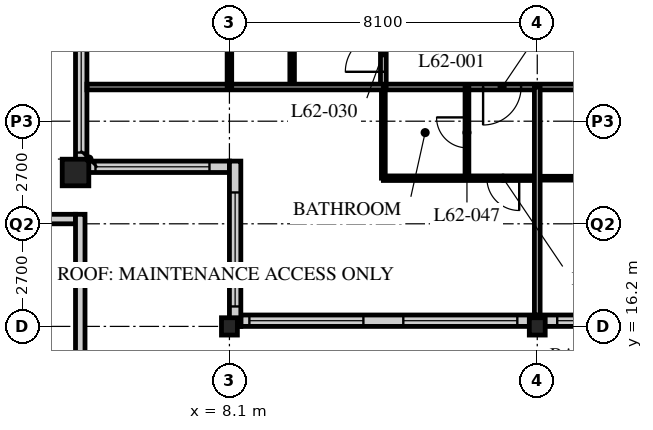
"""IFC4 building model, lengths in metres.
Left out: names, types, materials, properties, quantities, classifications, styles, units other than length and angle.
Written with IfcOpenShell. Run it as: python <this file> out.ifc"""

import sys

from ifc_helpers import new_model, si_unit, direction, frame, frame_2d, origin, origin_2d, place, context, subcontext, project, spatial, rectangle, hollow_rectangle, i_section, extrude, element, fill, save


model = new_model("IFC4")
c1 = context("Model", 3, precision=1e-05, world=origin(), true_north=direction((0.0, 1.0)))
c2 = subcontext(c1, "Body", "Model", "MODEL_VIEW")
j1 = project(units=[si_unit("LENGTHUNIT", "METRE"), si_unit("PLANEANGLEUNIT", "RADIAN")], contexts=[c1])
p1 = place(None, origin())
s1 = spatial("IfcSite", under=j1, at=p1, CompositionType="ELEMENT")
p2 = place(p1, origin())
s2 = spatial("IfcBuilding", under=s1, at=p2, CompositionType="ELEMENT")
p3 = place(p2, frame((0.0, 0.0, 242.4)))
s3 = spatial("IfcBuildingStorey", under=s2, at=p3, CompositionType="ELEMENT", Elevation=242.4)
p4 = place(p3, frame((4.05, 20.25, 0.0), z_axis=(0.0, 0.0, 1.0), x_axis=(1.0, 0.0, 0.0)))
e1 = element("IfcColumn", 1, at=p4, inside=s3, PredefinedType="COLUMN", context=c2, shape_type="SweptSolid", body=[
    extrude(hollow_rectangle(XDim=0.7, YDim=0.7, WallThickness=0.07, at=origin_2d()), origin(), (0.0, 0.0, 1.0), 3.9),
])
for number, where, z_axis, x_axis in (
    (2, (8.1, 16.2, 0.0), (0.0, 0.0, 1.0), (1.0, 0.0, 0.0)),
    (3, (16.2, 16.2, 0.0), (0.0, 0.0, 1.0), (1.0, 0.0, 0.0)),
):
    element("IfcColumn", number, at=place(p3, frame(where, z_axis=z_axis, x_axis=x_axis)), inside=s3, PredefinedType="COLUMN", context=c2, shape_type="SweptSolid", body=[
        extrude(i_section(OverallWidth=0.418, OverallDepth=0.456, WebThickness=0.042, FlangeThickness=0.067, FilletRadius=0.015, at=origin_2d()), origin(), (0.0, 0.0, 1.0), 3.9),
    ])
p5 = place(p3, frame((8.4, 16.35, 0.0), z_axis=(0.0, 0.0, 1.0), x_axis=(1.0, 0.0, 0.0)))
e4 = element("IfcWall", 4, at=p5, inside=s3, PredefinedType="SOLIDWALL", context=c2, shape_type="SweptSolid", body=[
    extrude(rectangle(XDim=40.2, YDim=0.3, at=frame_2d((20.1, 0.0))), origin(), (0.0, 0.0, 1.0), 3.69),
])
p6 = place(p5, frame((21.475, 0.0, 0.0)))
e5 = element("IfcOpeningElement", 5, at=p6, cuts=e4, PredefinedType="OPENING", context=c2, shape_type="SweptSolid", body=[
    extrude(rectangle(XDim=1.0, YDim=2.1, at=frame_2d((0.5, 1.05))), frame((0.0, 0.16, 0.0), z_axis=(0.0, -1.0, 0.0), x_axis=(1.0, 0.0, 0.0)), (0.0, 0.0, 1.0), 0.32),
])
p7 = place(p5, frame((0.225, 0.0, 0.6)))
e6 = element("IfcOpeningElement", 6, at=p7, cuts=e4, PredefinedType="OPENING", context=c2, shape_type="SweptSolid", body=[
    extrude(rectangle(XDim=3.0, YDim=2.3, at=frame_2d((1.5, 1.15))), frame((0.0, 0.16, 0.0), z_axis=(0.0, -1.0, 0.0), x_axis=(1.0, 0.0, 0.0)), (0.0, 0.0, 1.0), 0.32),
])
p8 = place(p5, frame((4.275, 0.0, 0.6)))
e7 = element("IfcOpeningElement", 7, at=p8, cuts=e4, PredefinedType="OPENING", context=c2, shape_type="SweptSolid", body=[
    extrude(rectangle(XDim=3.0, YDim=2.3, at=frame_2d((1.5, 1.15))), frame((0.0, 0.16, 0.0), z_axis=(0.0, -1.0, 0.0), x_axis=(1.0, 0.0, 0.0)), (0.0, 0.0, 1.0), 0.32),
])
p9 = place(p5, frame((8.325, 0.0, 0.6)))
e8 = element("IfcOpeningElement", 8, at=p9, cuts=e4, PredefinedType="OPENING", context=c2, shape_type="SweptSolid", body=[
    extrude(rectangle(XDim=3.0, YDim=2.3, at=frame_2d((1.5, 1.15))), frame((0.0, 0.16, 0.0), z_axis=(0.0, -1.0, 0.0), x_axis=(1.0, 0.0, 0.0)), (0.0, 0.0, 1.0), 0.32),
])
p10 = place(p5, frame((12.375, 0.0, 0.6)))
e9 = element("IfcOpeningElement", 9, at=p10, cuts=e4, PredefinedType="OPENING", context=c2, shape_type="SweptSolid", body=[
    extrude(rectangle(XDim=3.0, YDim=2.3, at=frame_2d((1.5, 1.15))), frame((0.0, 0.16, 0.0), z_axis=(0.0, -1.0, 0.0), x_axis=(1.0, 0.0, 0.0)), (0.0, 0.0, 1.0), 0.32),
])
p11 = place(p5, frame((16.425, 0.0, 0.6)))
e10 = element("IfcOpeningElement", 10, at=p11, cuts=e4, PredefinedType="OPENING", context=c2, shape_type="SweptSolid", body=[
    extrude(rectangle(XDim=3.0, YDim=2.3, at=frame_2d((1.5, 1.15))), frame((0.0, 0.16, 0.0), z_axis=(0.0, -1.0, 0.0), x_axis=(1.0, 0.0, 0.0)), (0.0, 0.0, 1.0), 0.32),
])
p12 = place(p5, frame((24.525, 0.0, 0.6)))
e11 = element("IfcOpeningElement", 11, at=p12, cuts=e4, PredefinedType="OPENING", context=c2, shape_type="SweptSolid", body=[
    extrude(rectangle(XDim=3.0, YDim=2.3, at=frame_2d((1.5, 1.15))), frame((0.0, 0.16, 0.0), z_axis=(0.0, -1.0, 0.0), x_axis=(1.0, 0.0, 0.0)), (0.0, 0.0, 1.0), 0.32),
])
p13 = place(p5, frame((28.575, 0.0, 0.6)))
e12 = element("IfcOpeningElement", 12, at=p13, cuts=e4, PredefinedType="OPENING", context=c2, shape_type="SweptSolid", body=[
    extrude(rectangle(XDim=3.0, YDim=2.3, at=frame_2d((1.5, 1.15))), frame((0.0, 0.16, 0.0), z_axis=(0.0, -1.0, 0.0), x_axis=(1.0, 0.0, 0.0)), (0.0, 0.0, 1.0), 0.32),
])
p14 = place(p5, frame((32.625, 0.0, 0.6)))
e13 = element("IfcOpeningElement", 13, at=p14, cuts=e4, PredefinedType="OPENING", context=c2, shape_type="SweptSolid", body=[
    extrude(rectangle(XDim=3.0, YDim=2.3, at=frame_2d((1.5, 1.15))), frame((0.0, 0.16, 0.0), z_axis=(0.0, -1.0, 0.0), x_axis=(1.0, 0.0, 0.0)), (0.0, 0.0, 1.0), 0.32),
])
p15 = place(p5, frame((36.675, 0.0, 0.6)))
e14 = element("IfcOpeningElement", 14, at=p15, cuts=e4, PredefinedType="OPENING", context=c2, shape_type="SweptSolid", body=[
    extrude(rectangle(XDim=3.0, YDim=2.3, at=frame_2d((1.5, 1.15))), frame((0.0, 0.16, 0.0), z_axis=(0.0, -1.0, 0.0), x_axis=(1.0, 0.0, 0.0)), (0.0, 0.0, 1.0), 0.32),
])
p16 = place(p3, frame((4.2, 24.6, 0.0), z_axis=(0.0, 0.0, 1.0), x_axis=(0.0, -1.0, 0.0)))
e15 = element("IfcWall", 15, at=p16, inside=s3, PredefinedType="SOLIDWALL", context=c2, shape_type="SweptSolid", body=[
    extrude(rectangle(XDim=4.35, YDim=0.3, at=frame_2d((2.175, 0.0))), origin(), (0.0, 0.0, 1.0), 3.69),
])
p17 = place(p16, frame((0.825, 0.0, 0.6)))
e16 = element("IfcOpeningElement", 16, at=p17, cuts=e15, PredefinedType="OPENING", context=c2, shape_type="SweptSolid", body=[
    extrude(rectangle(XDim=3.0, YDim=2.3, at=frame_2d((1.5, 1.15))), frame((0.0, 0.16, 0.0), z_axis=(0.0, -1.0, 0.0), x_axis=(1.0, 0.0, 0.0)), (0.0, 0.0, 1.0), 0.32),
])
p18 = place(p3, frame((4.35, 20.4, 0.0), z_axis=(0.0, 0.0, 1.0), x_axis=(1.0, 0.0, 0.0)))
e17 = element("IfcWall", 17, at=p18, inside=s3, PredefinedType="SOLIDWALL", context=c2, shape_type="SweptSolid", body=[
    extrude(rectangle(XDim=3.75, YDim=0.3, at=frame_2d((1.875, 0.0))), origin(), (0.0, 0.0, 1.0), 3.69),
])
p19 = place(p18, frame((0.225, 0.0, 0.6)))
e18 = element("IfcOpeningElement", 18, at=p19, cuts=e17, PredefinedType="OPENING", context=c2, shape_type="SweptSolid", body=[
    extrude(rectangle(XDim=3.0, YDim=2.3, at=frame_2d((1.5, 1.15))), frame((0.0, 0.16, 0.0), z_axis=(0.0, -1.0, 0.0), x_axis=(1.0, 0.0, 0.0)), (0.0, 0.0, 1.0), 0.32),
])
p20 = place(p3, frame((8.25, 20.55, 0.0), z_axis=(0.0, 0.0, 1.0), x_axis=(0.0, -1.0, 0.0)))
e19 = element("IfcWall", 19, at=p20, inside=s3, PredefinedType="SOLIDWALL", context=c2, shape_type="SweptSolid", body=[
    extrude(rectangle(XDim=4.35, YDim=0.3, at=frame_2d((2.175, 0.0))), origin(), (0.0, 0.0, 1.0), 3.69),
])
p21 = place(p20, frame((0.825, 0.0, 0.6)))
e20 = element("IfcOpeningElement", 20, at=p21, cuts=e19, PredefinedType="OPENING", context=c2, shape_type="SweptSolid", body=[
    extrude(rectangle(XDim=3.0, YDim=2.3, at=frame_2d((1.5, 1.15))), frame((0.0, 0.16, 0.0), z_axis=(0.0, -1.0, 0.0), x_axis=(1.0, 0.0, 0.0)), (0.0, 0.0, 1.0), 0.32),
])
p22 = place(p3, frame((0.25, 19.025, 0.0), z_axis=(0.0, 0.0, 1.0), x_axis=(1.0, 0.0, 0.0)))
e21 = element("IfcWall", 21, at=p22, inside=s3, PredefinedType="PARAPET", context=c2, shape_type="SweptSolid", body=[
    extrude(rectangle(XDim=3.8, YDim=0.25, at=frame_2d((1.9, 0.0))), origin(), (0.0, 0.0, 1.0), 1.38),
])
p23 = place(p3, frame((4.175, 19.15, 0.0), z_axis=(0.0, 0.0, 1.0), x_axis=(0.0, -1.0, 0.0)))
e22 = element("IfcWall", 22, at=p23, inside=s3, PredefinedType="PARAPET", context=c2, shape_type="SweptSolid", body=[
    extrude(rectangle(XDim=4.3, YDim=0.25, at=frame_2d((2.15, 0.0))), origin(), (0.0, 0.0, 1.0), 1.38),
])
p24 = place(p3, frame((12.15, 22.5, 0.0), z_axis=(0.0, 0.0, 1.0), x_axis=(1.0, 0.0, 0.0)))
e23 = element("IfcWall", 23, at=p24, inside=s3, PredefinedType="PARTITIONING", context=c2, shape_type="SweptSolid", body=[
    extrude(rectangle(XDim=32.4, YDim=0.15, at=frame_2d((16.2, 0.0))), origin(), (0.0, 0.0, 1.0), 3.69),
])
p25 = place(p24, frame((6.4, 0.0, 0.0)))
e24 = element("IfcOpeningElement", 24, at=p25, cuts=e23, PredefinedType="OPENING", context=c2, shape_type="SweptSolid", body=[
    extrude(rectangle(XDim=1.0, YDim=2.1, at=frame_2d((0.5, 1.05))), frame((0.0, 0.085, 0.0), z_axis=(0.0, -1.0, 0.0), x_axis=(1.0, 0.0, 0.0)), (0.0, 0.0, 1.0), 0.17),
])
p26 = place(p24, frame((10.45, 0.0, 0.0)))
e25 = element("IfcOpeningElement", 25, at=p26, cuts=e23, PredefinedType="OPENING", context=c2, shape_type="SweptSolid", body=[
    extrude(rectangle(XDim=1.0, YDim=2.1, at=frame_2d((0.5, 1.05))), frame((0.0, 0.085, 0.0), z_axis=(0.0, -1.0, 0.0), x_axis=(1.0, 0.0, 0.0)), (0.0, 0.0, 1.0), 0.17),
])
p27 = place(p24, frame((14.5, 0.0, 0.0)))
e26 = element("IfcOpeningElement", 26, at=p27, cuts=e23, PredefinedType="OPENING", context=c2, shape_type="SweptSolid", body=[
    extrude(rectangle(XDim=1.0, YDim=2.1, at=frame_2d((0.5, 1.05))), frame((0.0, 0.085, 0.0), z_axis=(0.0, -1.0, 0.0), x_axis=(1.0, 0.0, 0.0)), (0.0, 0.0, 1.0), 0.17),
])
p28 = place(p24, frame((17.725, 0.0, 0.0)))
e27 = element("IfcOpeningElement", 27, at=p28, cuts=e23, PredefinedType="OPENING", context=c2, shape_type="SweptSolid", body=[
    extrude(rectangle(XDim=1.0, YDim=2.1, at=frame_2d((0.5, 1.05))), frame((0.0, 0.085, 0.0), z_axis=(0.0, -1.0, 0.0), x_axis=(1.0, 0.0, 0.0)), (0.0, 0.0, 1.0), 0.17),
])
p29 = place(p24, frame((22.6, 0.0, 0.0)))
e28 = element("IfcOpeningElement", 28, at=p29, cuts=e23, PredefinedType="OPENING", context=c2, shape_type="SweptSolid", body=[
    extrude(rectangle(XDim=1.0, YDim=2.1, at=frame_2d((0.5, 1.05))), frame((0.0, 0.085, 0.0), z_axis=(0.0, -1.0, 0.0), x_axis=(1.0, 0.0, 0.0)), (0.0, 0.0, 1.0), 0.17),
])
p30 = place(p24, frame((26.65, 0.0, 0.0)))
e29 = element("IfcOpeningElement", 29, at=p30, cuts=e23, PredefinedType="OPENING", context=c2, shape_type="SweptSolid", body=[
    extrude(rectangle(XDim=1.0, YDim=2.1, at=frame_2d((0.5, 1.05))), frame((0.0, 0.085, 0.0), z_axis=(0.0, -1.0, 0.0), x_axis=(1.0, 0.0, 0.0)), (0.0, 0.0, 1.0), 0.17),
])
p31 = place(p24, frame((2.625, 0.0, 0.0)))
e30 = element("IfcOpeningElement", 30, at=p31, cuts=e23, PredefinedType="OPENING", context=c2, shape_type="SweptSolid", body=[
    extrude(rectangle(XDim=1.0, YDim=2.1, at=frame_2d((0.5, 1.05))), frame((0.0, 0.085, 0.0), z_axis=(0.0, -1.0, 0.0), x_axis=(1.0, 0.0, 0.0)), (0.0, 0.0, 1.0), 0.17),
])
p32 = place(p24, frame((28.775, 0.0, 0.0)))
e31 = element("IfcOpeningElement", 31, at=p32, cuts=e23, PredefinedType="OPENING", context=c2, shape_type="SweptSolid", body=[
    extrude(rectangle(XDim=1.0, YDim=2.1, at=frame_2d((0.5, 1.05))), frame((0.0, 0.085, 0.0), z_axis=(0.0, -1.0, 0.0), x_axis=(1.0, 0.0, 0.0)), (0.0, 0.0, 1.0), 0.17),
])
p33 = place(p3, frame((12.15, 22.5, 0.0), z_axis=(0.0, 0.0, 1.0), x_axis=(0.0, 1.0, 0.0)))
e32 = element("IfcWall", 32, at=p33, inside=s3, PredefinedType="PARTITIONING", context=c2, shape_type="SweptSolid", body=[
    extrude(rectangle(XDim=26.1, YDim=0.15, at=frame_2d((13.05, 0.0))), origin(), (0.0, 0.0, 1.0), 3.69),
])
p34 = place(p33, frame((0.4, 0.0, 0.0)))
e33 = element("IfcOpeningElement", 33, at=p34, cuts=e32, PredefinedType="OPENING", context=c2, shape_type="SweptSolid", body=[
    extrude(rectangle(XDim=1.0, YDim=2.1, at=frame_2d((0.5, 1.05))), frame((0.0, 0.085, 0.0), z_axis=(0.0, -1.0, 0.0), x_axis=(1.0, 0.0, 0.0)), (0.0, 0.0, 1.0), 0.17),
])
p35 = place(p33, frame((14.35, 0.0, 0.0)))
e34 = element("IfcOpeningElement", 34, at=p35, cuts=e32, PredefinedType="OPENING", context=c2, shape_type="SweptSolid", body=[
    extrude(rectangle(XDim=1.0, YDim=2.1, at=frame_2d((0.5, 1.05))), frame((0.0, 0.085, 0.0), z_axis=(0.0, -1.0, 0.0), x_axis=(1.0, 0.0, 0.0)), (0.0, 0.0, 1.0), 0.17),
])
p36 = place(p3, frame((16.2, 20.1, 0.0), z_axis=(0.0, 0.0, 1.0), x_axis=(1.0, 0.0, 0.0)))
e35 = element("IfcWall", 35, at=p36, inside=s3, PredefinedType="PARTITIONING", context=c2, shape_type="SweptSolid", body=[
    extrude(rectangle(XDim=2.2, YDim=0.1, at=frame_2d((1.1, 0.0))), origin(), (0.0, 0.0, 1.0), 3.69),
])
p37 = place(p3, frame((9.75, 22.5, 0.0), z_axis=(0.0, 0.0, 1.0), x_axis=(0.0, 1.0, 0.0)))
e36 = element("IfcWall", 36, at=p37, inside=s3, PredefinedType="PARTITIONING", context=c2, shape_type="SweptSolid", body=[
    extrude(rectangle(XDim=26.1, YDim=0.12, at=frame_2d((13.05, 0.0))), origin(), (0.0, 0.0, 1.0), 3.69),
])
p38 = place(p37, frame((0.975, 0.0, 0.0)))
e37 = element("IfcOpeningElement", 37, at=p38, cuts=e36, PredefinedType="OPENING", context=c2, shape_type="SweptSolid", body=[
    extrude(rectangle(XDim=0.85, YDim=2.1, at=frame_2d((0.425, 1.05))), frame((0.0, 0.07, 0.0), z_axis=(0.0, -1.0, 0.0), x_axis=(1.0, 0.0, 0.0)), (0.0, 0.0, 1.0), 0.14),
])
p39 = place(p37, frame((10.225, 0.0, 0.0)))
e38 = element("IfcOpeningElement", 38, at=p39, cuts=e36, PredefinedType="OPENING", context=c2, shape_type="SweptSolid", body=[
    extrude(rectangle(XDim=0.85, YDim=2.1, at=frame_2d((0.425, 1.05))), frame((0.0, 0.07, 0.0), z_axis=(0.0, -1.0, 0.0), x_axis=(1.0, 0.0, 0.0)), (0.0, 0.0, 1.0), 0.14),
])
p40 = place(p37, frame((14.925, 0.0, 0.0)))
e39 = element("IfcOpeningElement", 39, at=p40, cuts=e36, PredefinedType="OPENING", context=c2, shape_type="SweptSolid", body=[
    extrude(rectangle(XDim=0.85, YDim=2.1, at=frame_2d((0.425, 1.05))), frame((0.0, 0.07, 0.0), z_axis=(0.0, -1.0, 0.0), x_axis=(1.0, 0.0, 0.0)), (0.0, 0.0, 1.0), 0.14),
])
p41 = place(p37, frame((22.375, 0.0, 0.0)))
e40 = element("IfcOpeningElement", 40, at=p41, cuts=e36, PredefinedType="OPENING", context=c2, shape_type="SweptSolid", body=[
    extrude(rectangle(XDim=0.85, YDim=2.1, at=frame_2d((0.425, 1.05))), frame((0.0, 0.07, 0.0), z_axis=(0.0, -1.0, 0.0), x_axis=(1.0, 0.0, 0.0)), (0.0, 0.0, 1.0), 0.14),
])
p42 = place(p3, frame((12.15, 20.1, 0.0), z_axis=(0.0, 0.0, 1.0), x_axis=(1.0, 0.0, 0.0)))
e41 = element("IfcWall", 41, at=p42, inside=s3, PredefinedType="PARTITIONING", context=c2, shape_type="SweptSolid", body=[
    extrude(rectangle(XDim=4.05, YDim=0.12, at=frame_2d((2.025, 0.0))), origin(), (0.0, 0.0, 1.0), 3.69),
])
p43 = place(p42, frame((2.725, 0.0, 0.0)))
e42 = element("IfcOpeningElement", 42, at=p43, cuts=e41, PredefinedType="OPENING", context=c2, shape_type="SweptSolid", body=[
    extrude(rectangle(XDim=0.85, YDim=2.1, at=frame_2d((0.425, 1.05))), frame((0.0, 0.07, 0.0), z_axis=(0.0, -1.0, 0.0), x_axis=(1.0, 0.0, 0.0)), (0.0, 0.0, 1.0), 0.14),
])
p44 = place(p3, frame((14.35, 22.5, 0.0), z_axis=(0.0, 0.0, 1.0), x_axis=(0.0, -1.0, 0.0)))
e43 = element("IfcWall", 43, at=p44, inside=s3, PredefinedType="PARTITIONING", context=c2, shape_type="SweptSolid", body=[
    extrude(rectangle(XDim=2.4, YDim=0.1, at=frame_2d((1.2, 0.0))), origin(), (0.0, 0.0, 1.0), 3.69),
])
p45 = place(p44, frame((0.8, 0.0, 0.0)))
e44 = element("IfcOpeningElement", 44, at=p45, cuts=e43, PredefinedType="OPENING", context=c2, shape_type="SweptSolid", body=[
    extrude(rectangle(XDim=0.8, YDim=2.1, at=frame_2d((0.4, 1.05))), frame((0.0, 0.06, 0.0), z_axis=(0.0, -1.0, 0.0), x_axis=(1.0, 0.0, 0.0)), (0.0, 0.0, 1.0), 0.12),
])
p46 = place(p3, frame((12.15, 22.5, 0.0), z_axis=(0.0, 0.0, 1.0), x_axis=(0.0, -1.0, 0.0)))
e45 = element("IfcWall", 45, at=p46, inside=s3, PredefinedType="PARTITIONING", context=c2, shape_type="SweptSolid", body=[
    extrude(rectangle(XDim=2.4, YDim=0.1, at=frame_2d((1.2, 0.0))), origin(), (0.0, 0.0, 1.0), 3.69),
])
p47 = place(p3, frame((4.35, 22.5, 0.0), z_axis=(0.0, 0.0, 1.0), x_axis=(1.0, 0.0, 0.0)))
e46 = element("IfcWall", 46, at=p47, inside=s3, PredefinedType="PARTITIONING", context=c2, shape_type="SweptSolid", body=[
    extrude(rectangle(XDim=7.8, YDim=0.15, at=frame_2d((3.9, 0.0))), origin(), (0.0, 0.0, 1.0), 3.69),
])
p48 = place(p3, frame((16.2, 22.5, 0.0), z_axis=(0.0, 0.0, 1.0), x_axis=(0.0, -1.0, 0.0)))
e47 = element("IfcWall", 47, at=p48, inside=s3, PredefinedType="PARTITIONING", context=c2, shape_type="SweptSolid", body=[
    extrude(rectangle(XDim=6.0, YDim=0.15, at=frame_2d((3.0, 0.0))), origin(), (0.0, 0.0, 1.0), 2.928),
])
p49 = place(p3, frame((8.1, 22.5, 0.0), z_axis=(0.0, 0.0, 1.0), x_axis=(0.0, 1.0, 0.0)))
e48 = element("IfcWall", 48, at=p49, inside=s3, PredefinedType="PARTITIONING", context=c2, shape_type="SweptSolid", body=[
    extrude(rectangle(XDim=1.5, YDim=0.12, at=frame_2d((0.75, 0.0))), origin(), (0.0, 0.0, 1.0), 2.928),
])
p50 = place(p7, origin())
e49 = element("IfcWindow", 49, at=p50, inside=s3, PartitioningType="SINGLE_PANEL", PredefinedType="WINDOW", context=c2, shape_type="SweptSolid", body=[
    extrude(rectangle(XDim=3.0, YDim=2.3, at=frame_2d((1.5, 1.15))), frame((0.0, 0.03, 0.0), z_axis=(0.0, -1.0, 0.0), x_axis=(1.0, 0.0, 0.0)), (0.0, 0.0, 1.0), 0.06),
])
fill(e6, e49)
p51 = place(p8, origin())
e50 = element("IfcWindow", 50, at=p51, inside=s3, PartitioningType="SINGLE_PANEL", PredefinedType="WINDOW", context=c2, shape_type="SweptSolid", body=[
    extrude(rectangle(XDim=3.0, YDim=2.3, at=frame_2d((1.5, 1.15))), frame((0.0, 0.03, 0.0), z_axis=(0.0, -1.0, 0.0), x_axis=(1.0, 0.0, 0.0)), (0.0, 0.0, 1.0), 0.06),
])
fill(e7, e50)
p52 = place(p9, origin())
e51 = element("IfcWindow", 51, at=p52, inside=s3, PartitioningType="SINGLE_PANEL", PredefinedType="WINDOW", context=c2, shape_type="SweptSolid", body=[
    extrude(rectangle(XDim=3.0, YDim=2.3, at=frame_2d((1.5, 1.15))), frame((0.0, 0.03, 0.0), z_axis=(0.0, -1.0, 0.0), x_axis=(1.0, 0.0, 0.0)), (0.0, 0.0, 1.0), 0.06),
])
fill(e8, e51)
p53 = place(p17, origin())
e52 = element("IfcWindow", 52, at=p53, inside=s3, PartitioningType="SINGLE_PANEL", PredefinedType="WINDOW", context=c2, shape_type="SweptSolid", body=[
    extrude(rectangle(XDim=3.0, YDim=2.3, at=frame_2d((1.5, 1.15))), frame((0.0, 0.03, 0.0), z_axis=(0.0, -1.0, 0.0), x_axis=(1.0, 0.0, 0.0)), (0.0, 0.0, 1.0), 0.06),
])
fill(e16, e52)
p54 = place(p19, origin())
e53 = element("IfcWindow", 53, at=p54, inside=s3, PartitioningType="SINGLE_PANEL", PredefinedType="WINDOW", context=c2, shape_type="SweptSolid", body=[
    extrude(rectangle(XDim=3.0, YDim=2.3, at=frame_2d((1.5, 1.15))), frame((0.0, 0.03, 0.0), z_axis=(0.0, -1.0, 0.0), x_axis=(1.0, 0.0, 0.0)), (0.0, 0.0, 1.0), 0.06),
])
fill(e18, e53)
p55 = place(p21, origin())
e54 = element("IfcWindow", 54, at=p55, inside=s3, PartitioningType="SINGLE_PANEL", PredefinedType="WINDOW", context=c2, shape_type="SweptSolid", body=[
    extrude(rectangle(XDim=3.0, YDim=2.3, at=frame_2d((1.5, 1.15))), frame((0.0, 0.03, 0.0), z_axis=(0.0, -1.0, 0.0), x_axis=(1.0, 0.0, 0.0)), (0.0, 0.0, 1.0), 0.06),
])
fill(e20, e54)
p56 = place(p34, origin())
e55 = element("IfcDoor", 55, at=p56, inside=s3, OperationType="SINGLE_SWING_LEFT", PredefinedType="DOOR", context=c2, shape_type="SweptSolid", body=[
    extrude(rectangle(XDim=1.0, YDim=2.1, at=frame_2d((0.5, 1.05))), frame((0.0, 0.025, 0.0), z_axis=(0.0, -1.0, 0.0), x_axis=(1.0, 0.0, 0.0)), (0.0, 0.0, 1.0), 0.05),
])
fill(e33, e55)
p57 = place(p45, origin())
e56 = element("IfcDoor", 56, at=p57, inside=s3, OperationType="SINGLE_SWING_RIGHT", PredefinedType="DOOR", context=c2, shape_type="SweptSolid", body=[
    extrude(rectangle(XDim=0.8, YDim=2.1, at=frame_2d((0.4, 1.05))), frame((0.0, 0.025, 0.0), z_axis=(0.0, -1.0, 0.0), x_axis=(1.0, 0.0, 0.0)), (0.0, 0.0, 1.0), 0.05),
])
fill(e44, e56)
p58 = place(p31, origin())
e57 = element("IfcDoor", 57, at=p58, inside=s3, OperationType="SINGLE_SWING_RIGHT", PredefinedType="DOOR", context=c2, shape_type="SweptSolid", body=[
    extrude(rectangle(XDim=1.0, YDim=2.1, at=frame_2d((0.5, 1.05))), frame((0.0, 0.025, 0.0), z_axis=(0.0, -1.0, 0.0), x_axis=(1.0, 0.0, 0.0)), (0.0, 0.0, 1.0), 0.05),
])
fill(e30, e57)
p59 = place(p43, origin())
e58 = element("IfcDoor", 58, at=p59, inside=s3, OperationType="SINGLE_SWING_LEFT", PredefinedType="DOOR", context=c2, shape_type="SweptSolid", body=[
    extrude(rectangle(XDim=0.85, YDim=2.1, at=frame_2d((0.425, 1.05))), frame((0.0, 0.025, 0.0), z_axis=(0.0, -1.0, 0.0), x_axis=(1.0, 0.0, 0.0)), (0.0, 0.0, 1.0), 0.05),
])
fill(e42, e58)
save(model, sys.argv[1])
